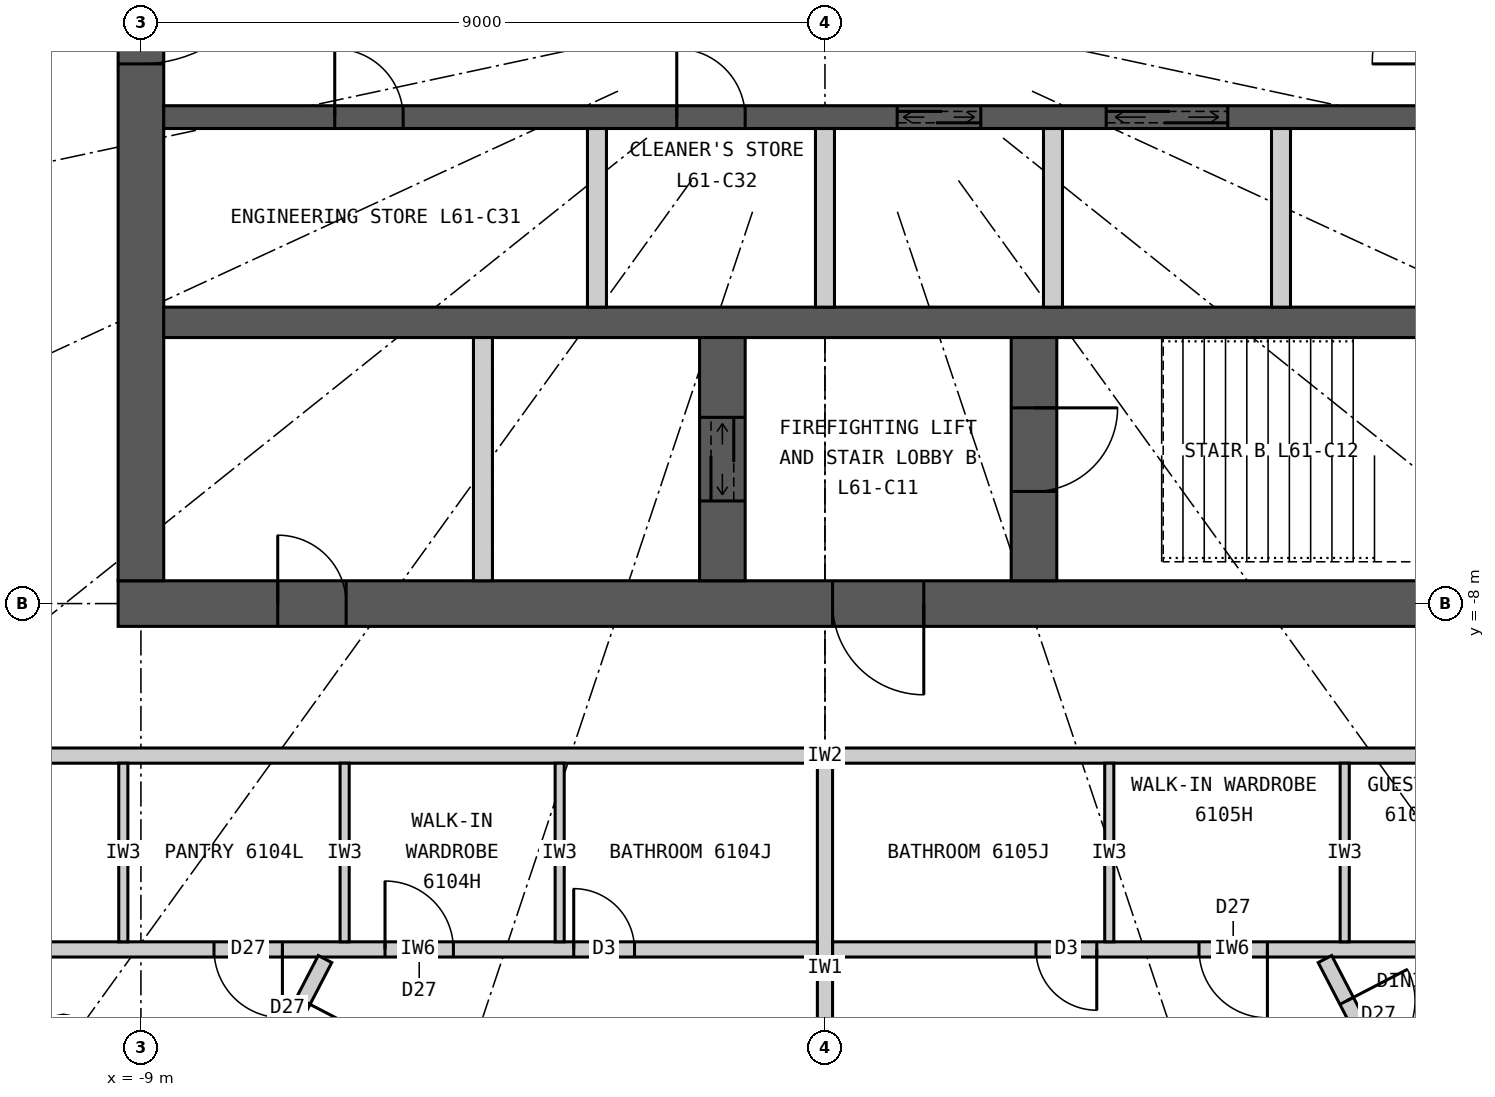
"""IFC4 building model, lengths in metres.
Left out: names, types, materials, properties, quantities, classifications, styles, units other than length and angle.
Written with IfcOpenShell. Run it as: python <this file> out.ifc"""

import sys

from ifc_helpers import new_model, si_unit, direction, frame, frame_2d, origin, origin_2d, place, context, subcontext, project, spatial, rectangle, circle, extrude, element, fill, save


model = new_model("IFC4")
c1 = context("Model", 3, precision=1e-05, world=origin(), true_north=direction((0.0, 1.0)))
c2 = subcontext(c1, "Body", "Model", "MODEL_VIEW")
j1 = project(units=[si_unit("LENGTHUNIT", "METRE"), si_unit("PLANEANGLEUNIT", "RADIAN")], contexts=[c1])
p1 = place(None, origin())
s1 = spatial("IfcSite", under=j1, at=p1, CompositionType="ELEMENT")
p2 = place(p1, origin())
s2 = spatial("IfcBuilding", under=s1, at=p2, CompositionType="ELEMENT")
p3 = place(p2, frame((0.0, 0.0, 225.9)))
s3 = spatial("IfcBuildingStorey", under=s2, at=p3, CompositionType="ELEMENT", Elevation=225.9)
p4 = place(p3, frame((-10.019, -13.883, 0.0), z_axis=(0.0, 0.0, 1.0), x_axis=(1.0, 0.0, 0.0)))
e1 = element("IfcColumn", 1, at=p4, inside=s3, PredefinedType="COLUMN", context=c2, shape_type="SweptSolid", body=[
    extrude(circle(Radius=0.45, at=origin_2d()), origin(), (0.0, 0.0, 1.0), 3.3),
])
p5 = place(p3, frame((9.3, -8.0, 0.0), z_axis=(0.0, 0.0, 1.0), x_axis=(-1.0, 0.0, 0.0)))
e2 = element("IfcWall", 2, at=p5, inside=s3, PredefinedType="SHEAR", context=c2, shape_type="SweptSolid", body=[
    extrude(rectangle(XDim=18.6, YDim=0.6, at=frame_2d((9.3, 0.0))), origin(), (0.0, 0.0, 1.0), 3.3),
])
p6 = place(p5, frame((8.0, 0.0, 0.0)))
e3 = element("IfcOpeningElement", 3, at=p6, cuts=e2, PredefinedType="OPENING", context=c2, shape_type="SweptSolid", body=[
    extrude(rectangle(XDim=1.2, YDim=2.2, at=frame_2d((0.6, 1.1))), frame((0.0, 0.31, 0.0), z_axis=(0.0, -1.0, 0.0), x_axis=(1.0, 0.0, 0.0)), (0.0, 0.0, 1.0), 0.62),
])
p7 = place(p5, frame((15.6, 0.0, 0.0)))
e4 = element("IfcOpeningElement", 4, at=p7, cuts=e2, PredefinedType="OPENING", context=c2, shape_type="SweptSolid", body=[
    extrude(rectangle(XDim=0.9, YDim=2.2, at=frame_2d((0.45, 1.1))), frame((0.0, 0.31, 0.0), z_axis=(0.0, -1.0, 0.0), x_axis=(1.0, 0.0, 0.0)), (0.0, 0.0, 1.0), 0.62),
])
p8 = place(p3, frame((-9.0, 7.7, 0.0), z_axis=(0.0, 0.0, 1.0), x_axis=(0.0, -1.0, 0.0)))
e5 = element("IfcWall", 5, at=p8, inside=s3, PredefinedType="SHEAR", context=c2, shape_type="SweptSolid", body=[
    extrude(rectangle(XDim=15.4, YDim=0.6, at=frame_2d((7.7, 0.0))), origin(), (0.0, 0.0, 1.0), 3.3),
])
p9 = place(p8, frame((6.8, 0.0, 0.0)))
e6 = element("IfcOpeningElement", 6, at=p9, cuts=e5, PredefinedType="OPENING", context=c2, shape_type="SweptSolid", body=[
    extrude(rectangle(XDim=1.8, YDim=2.2, at=frame_2d((0.9, 1.1))), frame((0.0, 0.31, 0.0), z_axis=(0.0, -1.0, 0.0), x_axis=(1.0, 0.0, 0.0)), (0.0, 0.0, 1.0), 0.62),
])
p10 = place(p3, frame((-8.7, -4.3, 0.0), z_axis=(0.0, 0.0, 1.0), x_axis=(1.0, 0.0, 0.0)))
e7 = element("IfcWall", 7, at=p10, inside=s3, PredefinedType="SHEAR", context=c2, shape_type="SweptSolid", body=[
    extrude(rectangle(XDim=17.4, YDim=0.4, at=frame_2d((8.7, 0.0))), origin(), (0.0, 0.0, 1.0), 3.3),
])
p11 = place(p3, frame((-8.7, -1.6, 0.0), z_axis=(0.0, 0.0, 1.0), x_axis=(1.0, 0.0, 0.0)))
e8 = element("IfcWall", 8, at=p11, inside=s3, PredefinedType="SHEAR", context=c2, shape_type="SweptSolid", body=[
    extrude(rectangle(XDim=17.4, YDim=0.3, at=frame_2d((8.7, 0.0))), origin(), (0.0, 0.0, 1.0), 3.3),
])
p12 = place(p11, frame((9.65, 0.0, 0.0)))
e9 = element("IfcOpeningElement", 9, at=p12, cuts=e8, PredefinedType="OPENING", context=c2, shape_type="SweptSolid", body=[
    extrude(rectangle(XDim=1.1, YDim=2.2, at=frame_2d((0.55, 1.1))), frame((0.0, 0.16, 0.0), z_axis=(0.0, -1.0, 0.0), x_axis=(1.0, 0.0, 0.0)), (0.0, 0.0, 1.0), 0.32),
])
p13 = place(p11, frame((12.4, 0.0, 0.0)))
e10 = element("IfcOpeningElement", 10, at=p13, cuts=e8, PredefinedType="OPENING", context=c2, shape_type="SweptSolid", body=[
    extrude(rectangle(XDim=1.6, YDim=2.4, at=frame_2d((0.8, 1.2))), frame((0.0, 0.16, 0.0), z_axis=(0.0, -1.0, 0.0), x_axis=(1.0, 0.0, 0.0)), (0.0, 0.0, 1.0), 0.32),
])
p14 = place(p11, frame((2.25, 0.0, 0.0)))
e11 = element("IfcOpeningElement", 11, at=p14, cuts=e8, PredefinedType="OPENING", context=c2, shape_type="SweptSolid", body=[
    extrude(rectangle(XDim=0.9, YDim=2.2, at=frame_2d((0.45, 1.1))), frame((0.0, 0.16, 0.0), z_axis=(0.0, -1.0, 0.0), x_axis=(1.0, 0.0, 0.0)), (0.0, 0.0, 1.0), 0.32),
])
p15 = place(p11, frame((6.75, 0.0, 0.0)))
e12 = element("IfcOpeningElement", 12, at=p15, cuts=e8, PredefinedType="OPENING", context=c2, shape_type="SweptSolid", body=[
    extrude(rectangle(XDim=0.9, YDim=2.2, at=frame_2d((0.45, 1.1))), frame((0.0, 0.16, 0.0), z_axis=(0.0, -1.0, 0.0), x_axis=(1.0, 0.0, 0.0)), (0.0, 0.0, 1.0), 0.32),
])
p16 = place(p3, frame((2.75, -7.7, 0.0), z_axis=(0.0, 0.0, 1.0), x_axis=(0.0, 1.0, 0.0)))
e13 = element("IfcWall", 13, at=p16, inside=s3, PredefinedType="SHEAR", context=c2, shape_type="SweptSolid", body=[
    extrude(rectangle(XDim=3.2, YDim=0.6, at=frame_2d((1.6, 0.0))), origin(), (0.0, 0.0, 1.0), 3.3),
])
p17 = place(p16, frame((1.175, 0.0, 0.0)))
e14 = element("IfcOpeningElement", 14, at=p17, cuts=e13, PredefinedType="OPENING", context=c2, shape_type="SweptSolid", body=[
    extrude(rectangle(XDim=1.1, YDim=2.2, at=frame_2d((0.55, 1.1))), frame((0.0, 0.31, 0.0), z_axis=(0.0, -1.0, 0.0), x_axis=(1.0, 0.0, 0.0)), (0.0, 0.0, 1.0), 0.62),
])
p18 = place(p3, frame((-1.35, -7.7, 0.0), z_axis=(0.0, 0.0, 1.0), x_axis=(0.0, 1.0, 0.0)))
e15 = element("IfcWall", 15, at=p18, inside=s3, PredefinedType="SHEAR", context=c2, shape_type="SweptSolid", body=[
    extrude(rectangle(XDim=3.2, YDim=0.6, at=frame_2d((1.6, 0.0))), origin(), (0.0, 0.0, 1.0), 3.3),
])
p19 = place(p18, frame((1.05, 0.0, 0.0)))
e16 = element("IfcOpeningElement", 16, at=p19, cuts=e15, PredefinedType="OPENING", context=c2, shape_type="SweptSolid", body=[
    extrude(rectangle(XDim=1.1, YDim=2.2, at=frame_2d((0.55, 1.1))), frame((0.0, 0.31, 0.0), z_axis=(0.0, -1.0, 0.0), x_axis=(1.0, 0.0, 0.0)), (0.0, 0.0, 1.0), 0.62),
])
p20 = place(p3, frame((-4.5, -7.7, 0.0), z_axis=(0.0, 0.0, 1.0), x_axis=(0.0, 1.0, 0.0)))
e17 = element("IfcWall", 17, at=p20, inside=s3, PredefinedType="PARTITIONING", context=c2, shape_type="SweptSolid", body=[
    extrude(rectangle(XDim=3.2, YDim=0.25, at=frame_2d((1.6, 0.0))), origin(), (0.0, 0.0, 1.0), 3.3),
])
for number, where, z_axis, x_axis in (
    (18, (-3.0, -4.1, 0.0), (0.0, 0.0, 1.0), (0.0, 1.0, 0.0)),
    (19, (0.0, -4.1, 0.0), (0.0, 0.0, 1.0), (0.0, 1.0, 0.0)),
    (20, (3.0, -4.1, 0.0), (0.0, 0.0, 1.0), (0.0, 1.0, 0.0)),
    (21, (6.0, -4.1, 0.0), (0.0, 0.0, 1.0), (0.0, 1.0, 0.0)),
):
    element("IfcWall", number, at=place(p3, frame(where, z_axis=z_axis, x_axis=x_axis)), inside=s3, PredefinedType="PARTITIONING", context=c2, shape_type="SweptSolid", body=[
        extrude(rectangle(XDim=2.35, YDim=0.25, at=frame_2d((1.175, 0.0))), origin(), (0.0, 0.0, 1.0), 3.3),
    ])
p21 = place(p3, frame((11.1, -10.0, 0.0), z_axis=(0.0, 0.0, 1.0), x_axis=(-1.0, 0.0, 0.0)))
e22 = element("IfcWall", 22, at=p21, inside=s3, PredefinedType="PARTITIONING", context=c2, shape_type="SweptSolid", body=[
    extrude(rectangle(XDim=22.2, YDim=0.2, at=frame_2d((11.1, 0.0))), origin(), (0.0, 0.0, 1.0), 3.12),
])
p22 = place(p21, frame((0.3, 0.0, 0.0)))
e23 = element("IfcOpeningElement", 23, at=p22, cuts=e22, PredefinedType="OPENING", context=c2, shape_type="SweptSolid", body=[
    extrude(rectangle(XDim=1.0, YDim=2.2, at=frame_2d((0.5, 1.1))), frame((0.0, 0.11, 0.0), z_axis=(0.0, -1.0, 0.0), x_axis=(1.0, 0.0, 0.0)), (0.0, 0.0, 1.0), 0.22),
])
p23 = place(p3, frame((0.0, -10.1, 0.0), z_axis=(0.0, 0.0, 1.0), x_axis=(0.0, -1.0, 0.0)))
e24 = element("IfcWall", 24, at=p23, inside=s3, PredefinedType="PARTITIONING", context=c2, shape_type="SweptSolid", body=[
    extrude(rectangle(XDim=5.4, YDim=0.2, at=frame_2d((2.7, 0.0))), origin(), (0.0, 0.0, 1.0), 2.42),
])
p24 = place(p3, frame((-10.609, -12.55, 0.0), z_axis=(0.0, 0.0, 1.0), x_axis=(1.0, 0.0, 0.0)))
e25 = element("IfcWall", 25, at=p24, inside=s3, PredefinedType="PARTITIONING", context=c2, shape_type="SweptSolid", body=[
    extrude(rectangle(XDim=10.508, YDim=0.2, at=frame_2d((5.254, 0.0))), origin(), (0.0, 0.0, 1.0), 3.12),
])
p25 = place(p24, frame((2.57, 0.0, 0.0)))
e26 = element("IfcOpeningElement", 26, at=p25, cuts=e25, PredefinedType="OPENING", context=c2, shape_type="SweptSolid", body=[
    extrude(rectangle(XDim=0.9, YDim=2.1, at=frame_2d((0.45, 1.05))), frame((0.0, 0.11, 0.0), z_axis=(0.0, -1.0, 0.0), x_axis=(1.0, 0.0, 0.0)), (0.0, 0.0, 1.0), 0.22),
])
p26 = place(p24, frame((4.82, 0.0, 0.0)))
e27 = element("IfcOpeningElement", 27, at=p26, cuts=e25, PredefinedType="OPENING", context=c2, shape_type="SweptSolid", body=[
    extrude(rectangle(XDim=0.9, YDim=2.1, at=frame_2d((0.45, 1.05))), frame((0.0, 0.11, 0.0), z_axis=(0.0, -1.0, 0.0), x_axis=(1.0, 0.0, 0.0)), (0.0, 0.0, 1.0), 0.22),
])
p27 = place(p24, frame((7.303, 0.0, 0.0)))
e28 = element("IfcOpeningElement", 28, at=p27, cuts=e25, PredefinedType="OPENING", context=c2, shape_type="SweptSolid", body=[
    extrude(rectangle(XDim=0.8, YDim=2.1, at=frame_2d((0.4, 1.05))), frame((0.0, 0.11, 0.0), z_axis=(0.0, -1.0, 0.0), x_axis=(1.0, 0.0, 0.0)), (0.0, 0.0, 1.0), 0.22),
])
p28 = place(p3, frame((-6.578, -12.677, 0.0), z_axis=(0.0, 0.0, 1.0), x_axis=(-0.460620531465, -0.887597164255, 0.0)))
e29 = element("IfcWall", 29, at=p28, inside=s3, PredefinedType="PARTITIONING", context=c2, shape_type="SweptSolid", body=[
    extrude(rectangle(XDim=2.678, YDim=0.2, at=frame_2d((1.339, 0.0))), origin(), (0.0, 0.0, 1.0), 3.12),
])
p29 = place(p28, frame((0.62, 0.0, 0.0)))
e30 = element("IfcOpeningElement", 30, at=p29, cuts=e29, PredefinedType="OPENING", context=c2, shape_type="SweptSolid", body=[
    extrude(rectangle(XDim=0.9, YDim=2.1, at=frame_2d((0.45, 1.05))), frame((0.0, 0.11, 0.0), z_axis=(0.0, -1.0, 0.0), x_axis=(1.0, 0.0, 0.0)), (0.0, 0.0, 1.0), 0.22),
])
for number, where, z_axis, x_axis in (
    (31, (-9.232, -10.1, 0.0), (0.0, 0.0, 1.0), (0.0, -1.0, 0.0)),
    (32, (-6.32, -10.1, 0.0), (0.0, 0.0, 1.0), (0.0, -1.0, 0.0)),
    (33, (-3.491, -10.1, 0.0), (0.0, 0.0, 1.0), (0.0, -1.0, 0.0)),
):
    element("IfcWall", number, at=place(p3, frame(where, z_axis=z_axis, x_axis=x_axis)), inside=s3, PredefinedType="PARTITIONING", context=c2, shape_type="SweptSolid", body=[
        extrude(rectangle(XDim=2.35, YDim=0.12, at=frame_2d((1.175, 0.0))), origin(), (0.0, 0.0, 1.0), 3.12),
    ])
p30 = place(p3, frame((0.101, -12.55, 0.0), z_axis=(0.0, 0.0, 1.0), x_axis=(1.0, 0.0, 0.0)))
e34 = element("IfcWall", 34, at=p30, inside=s3, PredefinedType="PARTITIONING", context=c2, shape_type="SweptSolid", body=[
    extrude(rectangle(XDim=10.508, YDim=0.2, at=frame_2d((5.254, 0.0))), origin(), (0.0, 0.0, 1.0), 3.12),
])
p31 = place(p30, frame((2.675, 0.0, 0.0)))
e35 = element("IfcOpeningElement", 35, at=p31, cuts=e34, PredefinedType="OPENING", context=c2, shape_type="SweptSolid", body=[
    extrude(rectangle(XDim=0.8, YDim=2.1, at=frame_2d((0.4, 1.05))), frame((0.0, 0.11, 0.0), z_axis=(0.0, -1.0, 0.0), x_axis=(1.0, 0.0, 0.0)), (0.0, 0.0, 1.0), 0.22),
])
p32 = place(p30, frame((4.82, 0.0, 0.0)))
e36 = element("IfcOpeningElement", 36, at=p32, cuts=e34, PredefinedType="OPENING", context=c2, shape_type="SweptSolid", body=[
    extrude(rectangle(XDim=0.9, YDim=2.1, at=frame_2d((0.45, 1.05))), frame((0.0, 0.11, 0.0), z_axis=(0.0, -1.0, 0.0), x_axis=(1.0, 0.0, 0.0)), (0.0, 0.0, 1.0), 0.22),
])
p33 = place(p3, frame((6.578, -12.677, 0.0), z_axis=(0.0, 0.0, 1.0), x_axis=(0.460620531465, -0.887597164255, 0.0)))
e37 = element("IfcWall", 37, at=p33, inside=s3, PredefinedType="PARTITIONING", context=c2, shape_type="SweptSolid", body=[
    extrude(rectangle(XDim=2.678, YDim=0.2, at=frame_2d((1.339, 0.0))), origin(), (0.0, 0.0, 1.0), 3.12),
])
p34 = place(p33, frame((0.62, 0.0, 0.0)))
e38 = element("IfcOpeningElement", 38, at=p34, cuts=e37, PredefinedType="OPENING", context=c2, shape_type="SweptSolid", body=[
    extrude(rectangle(XDim=0.9, YDim=2.1, at=frame_2d((0.45, 1.05))), frame((0.0, 0.11, 0.0), z_axis=(0.0, -1.0, 0.0), x_axis=(1.0, 0.0, 0.0)), (0.0, 0.0, 1.0), 0.22),
])
for number, where, z_axis, x_axis in (
    (39, (3.74, -10.1, 0.0), (0.0, 0.0, 1.0), (0.0, -1.0, 0.0)),
    (40, (6.838, -10.1, 0.0), (0.0, 0.0, 1.0), (0.0, -1.0, 0.0)),
):
    element("IfcWall", number, at=place(p3, frame(where, z_axis=z_axis, x_axis=x_axis)), inside=s3, PredefinedType="PARTITIONING", context=c2, shape_type="SweptSolid", body=[
        extrude(rectangle(XDim=2.35, YDim=0.12, at=frame_2d((1.175, 0.0))), origin(), (0.0, 0.0, 1.0), 3.12),
    ])
p35 = place(p25, origin())
e41 = element("IfcDoor", 41, at=p35, inside=s3, OperationType="SINGLE_SWING_RIGHT", PredefinedType="DOOR", context=c2, shape_type="SweptSolid", body=[
    extrude(rectangle(XDim=0.9, YDim=2.1, at=frame_2d((0.45, 1.05))), frame((0.0, 0.025, 0.0), z_axis=(0.0, -1.0, 0.0), x_axis=(1.0, 0.0, 0.0)), (0.0, 0.0, 1.0), 0.05),
])
fill(e26, e41)
p36 = place(p26, origin())
e42 = element("IfcDoor", 42, at=p36, inside=s3, OperationType="SINGLE_SWING_LEFT", PredefinedType="DOOR", context=c2, shape_type="SweptSolid", body=[
    extrude(rectangle(XDim=0.9, YDim=2.1, at=frame_2d((0.45, 1.05))), frame((0.0, 0.025, 0.0), z_axis=(0.0, -1.0, 0.0), x_axis=(1.0, 0.0, 0.0)), (0.0, 0.0, 1.0), 0.05),
])
fill(e27, e42)
p37 = place(p27, origin())
e43 = element("IfcDoor", 43, at=p37, inside=s3, OperationType="SINGLE_SWING_LEFT", PredefinedType="DOOR", context=c2, shape_type="SweptSolid", body=[
    extrude(rectangle(XDim=0.8, YDim=2.1, at=frame_2d((0.4, 1.05))), frame((0.0, 0.025, 0.0), z_axis=(0.0, -1.0, 0.0), x_axis=(1.0, 0.0, 0.0)), (0.0, 0.0, 1.0), 0.05),
])
fill(e28, e43)
p38 = place(p29, origin())
e44 = element("IfcDoor", 44, at=p38, inside=s3, OperationType="SINGLE_SWING_LEFT", PredefinedType="DOOR", context=c2, shape_type="SweptSolid", body=[
    extrude(rectangle(XDim=0.9, YDim=2.1, at=frame_2d((0.45, 1.05))), frame((0.0, 0.025, 0.0), z_axis=(0.0, -1.0, 0.0), x_axis=(1.0, 0.0, 0.0)), (0.0, 0.0, 1.0), 0.05),
])
fill(e30, e44)
p39 = place(p31, origin())
e45 = element("IfcDoor", 45, at=p39, inside=s3, OperationType="SINGLE_SWING_RIGHT", PredefinedType="DOOR", context=c2, shape_type="SweptSolid", body=[
    extrude(rectangle(XDim=0.8, YDim=2.1, at=frame_2d((0.4, 1.05))), frame((0.0, 0.025, 0.0), z_axis=(0.0, -1.0, 0.0), x_axis=(1.0, 0.0, 0.0)), (0.0, 0.0, 1.0), 0.05),
])
fill(e35, e45)
p40 = place(p32, origin())
e46 = element("IfcDoor", 46, at=p40, inside=s3, OperationType="SINGLE_SWING_RIGHT", PredefinedType="DOOR", context=c2, shape_type="SweptSolid", body=[
    extrude(rectangle(XDim=0.9, YDim=2.1, at=frame_2d((0.45, 1.05))), frame((0.0, 0.025, 0.0), z_axis=(0.0, -1.0, 0.0), x_axis=(1.0, 0.0, 0.0)), (0.0, 0.0, 1.0), 0.05),
])
fill(e36, e46)
p41 = place(p34, origin())
e47 = element("IfcDoor", 47, at=p41, inside=s3, OperationType="SINGLE_SWING_LEFT", PredefinedType="DOOR", context=c2, shape_type="SweptSolid", body=[
    extrude(rectangle(XDim=0.9, YDim=2.1, at=frame_2d((0.45, 1.05))), frame((0.0, 0.025, 0.0), z_axis=(0.0, -1.0, 0.0), x_axis=(1.0, 0.0, 0.0)), (0.0, 0.0, 1.0), 0.05),
])
fill(e38, e47)
p42 = place(p6, origin())
e48 = element("IfcDoor", 48, at=p42, inside=s3, OperationType="SINGLE_SWING_LEFT", PredefinedType="DOOR", context=c2, shape_type="SweptSolid", body=[
    extrude(rectangle(XDim=1.2, YDim=2.2, at=frame_2d((0.6, 1.1))), frame((0.0, 0.025, 0.0), z_axis=(0.0, -1.0, 0.0), x_axis=(1.0, 0.0, 0.0)), (0.0, 0.0, 1.0), 0.05),
])
fill(e3, e48)
p43 = place(p17, origin())
e49 = element("IfcDoor", 49, at=p43, inside=s3, OperationType="SINGLE_SWING_RIGHT", PredefinedType="DOOR", context=c2, shape_type="SweptSolid", body=[
    extrude(rectangle(XDim=1.1, YDim=2.2, at=frame_2d((0.55, 1.1))), frame((0.0, 0.025, 0.0), z_axis=(0.0, -1.0, 0.0), x_axis=(1.0, 0.0, 0.0)), (0.0, 0.0, 1.0), 0.05),
])
fill(e14, e49)
p44 = place(p19, origin())
e50 = element("IfcDoor", 50, at=p44, inside=s3, OperationType="DOUBLE_DOOR_SLIDING", PredefinedType="DOOR", context=c2, shape_type="SweptSolid", body=[
    extrude(rectangle(XDim=1.1, YDim=2.2, at=frame_2d((0.55, 1.1))), frame((0.0, 0.025, 0.0), z_axis=(0.0, -1.0, 0.0), x_axis=(1.0, 0.0, 0.0)), (0.0, 0.0, 1.0), 0.05),
])
fill(e16, e50)
p45 = place(p7, origin())
e51 = element("IfcDoor", 51, at=p45, inside=s3, OperationType="SINGLE_SWING_RIGHT", PredefinedType="DOOR", context=c2, shape_type="SweptSolid", body=[
    extrude(rectangle(XDim=0.9, YDim=2.2, at=frame_2d((0.45, 1.1))), frame((0.0, 0.025, 0.0), z_axis=(0.0, -1.0, 0.0), x_axis=(1.0, 0.0, 0.0)), (0.0, 0.0, 1.0), 0.05),
])
fill(e4, e51)
p46 = place(p12, origin())
e52 = element("IfcDoor", 52, at=p46, inside=s3, OperationType="DOUBLE_DOOR_SLIDING", PredefinedType="DOOR", context=c2, shape_type="SweptSolid", body=[
    extrude(rectangle(XDim=1.1, YDim=2.2, at=frame_2d((0.55, 1.1))), frame((0.0, 0.025, 0.0), z_axis=(0.0, -1.0, 0.0), x_axis=(1.0, 0.0, 0.0)), (0.0, 0.0, 1.0), 0.05),
])
fill(e9, e52)
p47 = place(p13, origin())
e53 = element("IfcDoor", 53, at=p47, inside=s3, OperationType="DOUBLE_DOOR_SLIDING", PredefinedType="DOOR", context=c2, shape_type="SweptSolid", body=[
    extrude(rectangle(XDim=1.6, YDim=2.4, at=frame_2d((0.8, 1.2))), frame((0.0, 0.025, 0.0), z_axis=(0.0, -1.0, 0.0), x_axis=(1.0, 0.0, 0.0)), (0.0, 0.0, 1.0), 0.05),
])
fill(e10, e53)
p48 = place(p14, origin())
e54 = element("IfcDoor", 54, at=p48, inside=s3, OperationType="SINGLE_SWING_LEFT", PredefinedType="DOOR", context=c2, shape_type="SweptSolid", body=[
    extrude(rectangle(XDim=0.9, YDim=2.2, at=frame_2d((0.45, 1.1))), frame((0.0, 0.025, 0.0), z_axis=(0.0, -1.0, 0.0), x_axis=(1.0, 0.0, 0.0)), (0.0, 0.0, 1.0), 0.05),
])
fill(e11, e54)
p49 = place(p15, origin())
e55 = element("IfcDoor", 55, at=p49, inside=s3, OperationType="SINGLE_SWING_LEFT", PredefinedType="DOOR", context=c2, shape_type="SweptSolid", body=[
    extrude(rectangle(XDim=0.9, YDim=2.2, at=frame_2d((0.45, 1.1))), frame((0.0, 0.025, 0.0), z_axis=(0.0, -1.0, 0.0), x_axis=(1.0, 0.0, 0.0)), (0.0, 0.0, 1.0), 0.05),
])
fill(e12, e55)
p50 = place(p9, origin())
e56 = element("IfcDoor", 56, at=p50, inside=s3, OperationType="DOUBLE_DOOR_DOUBLE_SWING", PredefinedType="DOOR", context=c2, shape_type="SweptSolid", body=[
    extrude(rectangle(XDim=1.8, YDim=2.2, at=frame_2d((0.9, 1.1))), frame((0.0, 0.025, 0.0), z_axis=(0.0, -1.0, 0.0), x_axis=(1.0, 0.0, 0.0)), (0.0, 0.0, 1.0), 0.05),
])
fill(e6, e56)
save(model, sys.argv[1])
